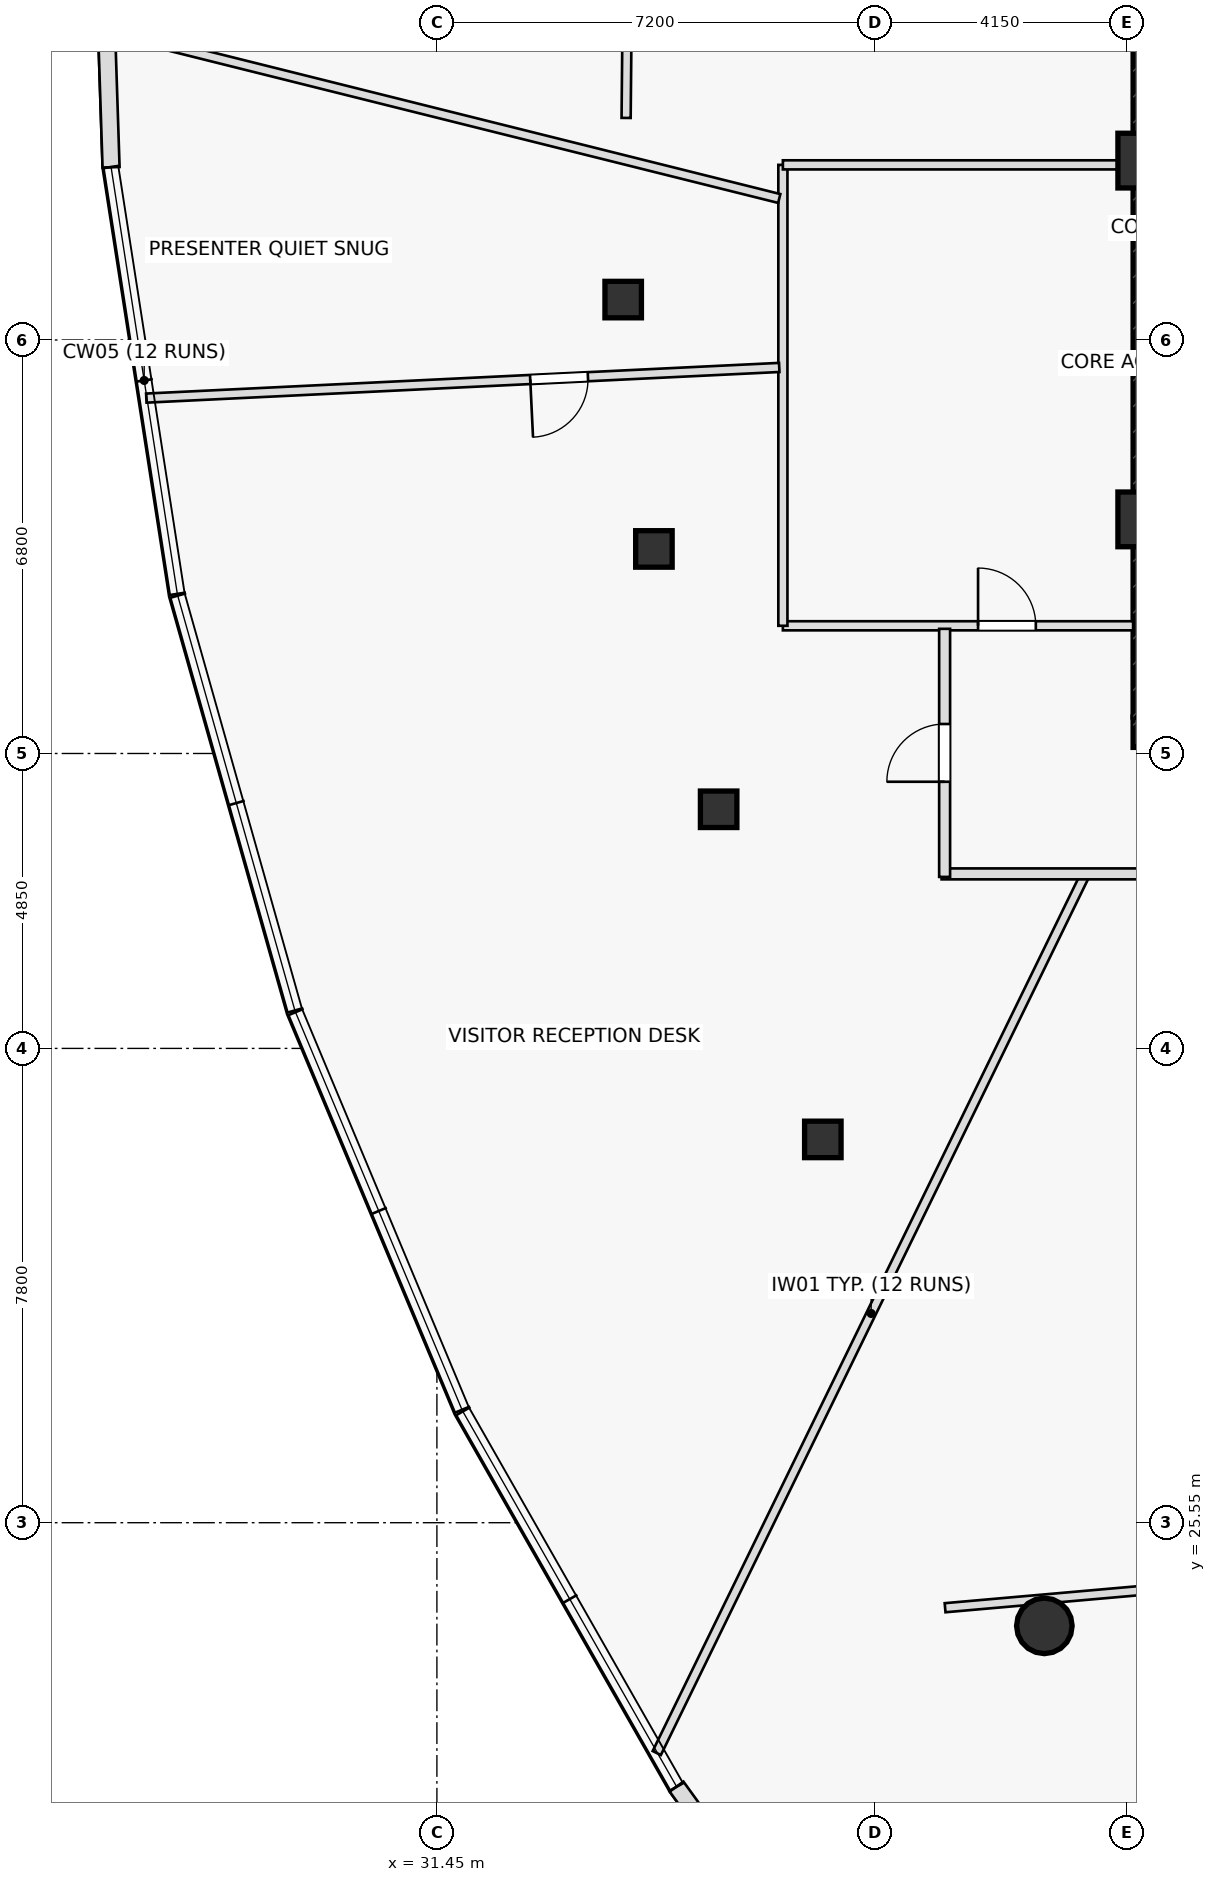
"""IFC4 building model, lengths in metres.
Left out: names, types, materials, properties, quantities, classifications, styles, units other than length and angle.
Written with IfcOpenShell. Run it as: python <this file> out.ifc"""

import sys

from ifc_helpers import new_model, si_unit, direction, frame, frame_2d, origin, origin_2d, place, context, subcontext, project, spatial, rectangle, hollow_rectangle, hollow_circle, extrude, element, fill, save


model = new_model("IFC4")
c1 = context("Model", 3, precision=1e-05, world=origin(), true_north=direction((0.0, 1.0)))
c2 = subcontext(c1, "Body", "Model", "MODEL_VIEW")
j1 = project(units=[si_unit("LENGTHUNIT", "METRE"), si_unit("PLANEANGLEUNIT", "RADIAN")], contexts=[c1])
p1 = place(None, origin())
s1 = spatial("IfcSite", under=j1, at=p1, CompositionType="ELEMENT")
p2 = place(p1, origin())
s2 = spatial("IfcBuilding", under=s1, at=p2, CompositionType="ELEMENT")
p3 = place(p2, frame((0.0, 0.0, 216.95)))
s3 = spatial("IfcBuildingStorey", under=s2, at=p3, CompositionType="ELEMENT", Elevation=216.95)
p4 = place(p3, frame((42.9, 38.55, 0.0), z_axis=(0.0, 0.0, 1.0), x_axis=(1.0, 0.0, 0.0)))
e1 = element("IfcWall", 1, at=p4, inside=s3, PredefinedType="SHEAR", context=c2, shape_type="SweptSolid", body=[
    extrude(rectangle(XDim=14.2, YDim=0.5, at=frame_2d((7.1, 0.0))), origin(), (0.0, 0.0, 1.0), 4.9),
])
p5 = place(p4, frame((0.78, 0.0, 0.0)))
e2 = element("IfcOpeningElement", 2, at=p5, cuts=e1, PredefinedType="OPENING", context=c2, shape_type="SweptSolid", body=[
    extrude(rectangle(XDim=1.05, YDim=2.2, at=frame_2d((0.525, 1.1))), frame((0.0, 0.26, 0.0), z_axis=(0.0, -1.0, 0.0), x_axis=(1.0, 0.0, 0.0)), (0.0, 0.0, 1.0), 0.52),
])
p6 = place(p3, frame((43.15, 38.8, 0.0), z_axis=(0.0, 0.0, 1.0), x_axis=(0.0, 1.0, 0.0)))
e3 = element("IfcWall", 3, at=p6, inside=s3, PredefinedType="SHEAR", context=c2, shape_type="SweptSolid", body=[
    extrude(rectangle(XDim=12.4, YDim=0.5, at=frame_2d((6.2, 0.0))), origin(), (0.0, 0.0, 1.0), 4.9),
])
for number, where, z_axis, x_axis in (
    (4, (43.1, 47.95, 0.0), (0.0, 0.0, 1.0), (1.0, 0.0, 0.0)),
    (5, (43.1, 42.05, 0.0), (0.0, 0.0, 1.0), (1.0, 0.0, 0.0)),
):
    element("IfcColumn", number, at=place(p3, frame(where, z_axis=z_axis, x_axis=x_axis)), inside=s3, PredefinedType="COLUMN", context=c2, shape_type="SweptSolid", body=[
        extrude(rectangle(XDim=0.9, YDim=0.9, at=origin_2d()), origin(), (0.0, 0.0, 1.0), 4.9),
    ])
for number, where, z_axis, x_axis in (
    (6, (34.514, 45.665, 0.0), (0.0, 0.0, 1.0), (1.0, 0.0, 0.0)),
    (7, (35.019, 41.564, 0.0), (0.0, 0.0, 1.0), (1.0, 0.0, 0.0)),
    (8, (36.083, 37.282, 0.0), (0.0, 0.0, 1.0), (1.0, 0.0, 0.0)),
    (9, (37.797, 31.853, 0.0), (0.0, 0.0, 1.0), (1.0, 0.0, 0.0)),
):
    element("IfcColumn", number, at=place(p3, frame(where, z_axis=z_axis, x_axis=x_axis)), inside=s3, PredefinedType="COLUMN", context=c2, shape_type="SweptSolid", body=[
        extrude(hollow_rectangle(XDim=0.6, YDim=0.6, WallThickness=0.036, at=origin_2d()), origin(), (0.0, 0.0, 1.0), 4.9),
    ])
p7 = place(p3, frame((41.44, 23.854, 0.0), z_axis=(0.0, 0.0, 1.0), x_axis=(1.0, 0.0, 0.0)))
e10 = element("IfcColumn", 10, at=p7, inside=s3, PredefinedType="COLUMN", context=c2, shape_type="SweptSolid", body=[
    extrude(hollow_circle(Radius=0.457, WallThickness=0.04, at=origin_2d()), origin(), (0.0, 0.0, 1.0), 4.9),
])
p8 = place(p3, frame((34.652, 58.056, 0.0), z_axis=(0.0, 0.0, 1.0), x_axis=(-0.009553538759, -0.999954363907, 0.0)))
e11 = element("IfcWall", 11, at=p8, inside=s3, PredefinedType="PARTITIONING", context=c2, shape_type="SweptSolid", body=[
    extrude(rectangle(XDim=9.404, YDim=0.15, at=frame_2d((4.702, 0.0))), origin(), (0.0, 0.0, 1.0), 4.385),
])
p9 = place(p3, frame((39.808, 24.152, 0.0), z_axis=(0.0, 0.0, 1.0), x_axis=(0.996153584085, 0.087624408208, 0.0)))
e12 = element("IfcWall", 12, at=p9, inside=s3, PredefinedType="PARTITIONING", context=c2, shape_type="SweptSolid", body=[
    extrude(rectangle(XDim=10.632, YDim=0.15, at=frame_2d((5.316, 0.0))), origin(), (0.0, 0.0, 1.0), 4.385),
])
p10 = place(p3, frame((37.14, 40.3, 0.0), z_axis=(0.0, 0.0, 1.0), x_axis=(1.0, 0.0, 0.0)))
e13 = element("IfcWall", 13, at=p10, inside=s3, PredefinedType="PARTITIONING", context=c2, shape_type="SweptSolid", body=[
    extrude(rectangle(XDim=5.76, YDim=0.15, at=frame_2d((2.88, 0.0))), origin(), (0.0, 0.0, 1.0), 4.275),
])
p11 = place(p10, frame((3.21, 0.0, 0.0)))
e14 = element("IfcOpeningElement", 14, at=p11, cuts=e13, PredefinedType="OPENING", context=c2, shape_type="SweptSolid", body=[
    extrude(rectangle(XDim=0.95, YDim=2.05, at=frame_2d((0.475, 1.025))), frame((0.0, 0.085, 0.0), z_axis=(0.0, -1.0, 0.0), x_axis=(1.0, 0.0, 0.0)), (0.0, 0.0, 1.0), 0.17),
])
p12 = place(p3, frame((37.14, 40.3, 0.0), z_axis=(0.0, 0.0, 1.0), x_axis=(0.0, 1.0, 0.0)))
e15 = element("IfcWall", 15, at=p12, inside=s3, PredefinedType="PARTITIONING", context=c2, shape_type="SweptSolid", body=[
    extrude(rectangle(XDim=7.58, YDim=0.15, at=frame_2d((3.79, 0.0))), origin(), (0.0, 0.0, 1.0), 4.9),
])
p13 = place(p3, frame((37.14, 47.88, 0.0), z_axis=(0.0, 0.0, 1.0), x_axis=(1.0, 0.0, 0.0)))
e16 = element("IfcWall", 16, at=p13, inside=s3, PredefinedType="PARTITIONING", context=c2, shape_type="SweptSolid", body=[
    extrude(rectangle(XDim=5.76, YDim=0.15, at=frame_2d((2.88, 0.0))), origin(), (0.0, 0.0, 1.0), 4.275),
])
p14 = place(p3, frame((42.118, 36.22, 0.0), z_axis=(0.0, 0.0, 1.0), x_axis=(-0.438364723484, -0.898797179126, 0.0)))
e17 = element("IfcWall", 17, at=p14, inside=s3, PredefinedType="PARTITIONING", context=c2, shape_type="SweptSolid", body=[
    extrude(rectangle(XDim=16.086, YDim=0.15, at=frame_2d((8.043, 0.0))), origin(), (0.0, 0.0, 1.0), 4.385),
])
p15 = place(p3, frame((37.08, 47.327, 0.0), z_axis=(0.0, 0.0, 1.0), x_axis=(-0.970214185524, 0.242248703214, 0.0)))
e18 = element("IfcWall", 18, at=p15, inside=s3, PredefinedType="PARTITIONING", context=c2, shape_type="SweptSolid", body=[
    extrude(rectangle(XDim=11.412, YDim=0.15, at=frame_2d((5.706, 0.0))), origin(), (0.0, 0.0, 1.0), 4.385),
])
p16 = place(p3, frame((37.08, 44.549, 0.0), z_axis=(0.0, 0.0, 1.0), x_axis=(-0.998828037423, -0.048399913813, 0.0)))
e19 = element("IfcWall", 19, at=p16, inside=s3, PredefinedType="PARTITIONING", context=c2, shape_type="SweptSolid", body=[
    extrude(rectangle(XDim=10.421, YDim=0.15, at=frame_2d((5.211, 0.0))), origin(), (0.0, 0.0, 1.0), 4.385),
])
p17 = place(p16, frame((3.15, 0.0, 0.0)))
e20 = element("IfcOpeningElement", 20, at=p17, cuts=e19, PredefinedType="OPENING", context=c2, shape_type="SweptSolid", body=[
    extrude(rectangle(XDim=0.95, YDim=2.05, at=frame_2d((0.475, 1.025))), frame((0.0, 0.085, 0.0), z_axis=(0.0, -1.0, 0.0), x_axis=(1.0, 0.0, 0.0)), (0.0, 0.0, 1.0), 0.17),
])
p18 = place(p3, frame((59.23, 36.22, 0.0), z_axis=(0.0, 0.0, 1.0), x_axis=(-1.0, 0.0, 0.0)))
e21 = element("IfcWall", 21, at=p18, inside=s3, PredefinedType="PARTITIONING", context=c2, shape_type="SweptSolid", body=[
    extrude(rectangle(XDim=19.48, YDim=0.18, at=frame_2d((9.74, 0.0))), origin(), (0.0, 0.0, 1.0), 4.275),
])
p19 = place(p18, frame((3.18, 0.0, 0.0)))
e22 = element("IfcOpeningElement", 22, at=p19, cuts=e21, PredefinedType="OPENING", context=c2, shape_type="SweptSolid", body=[
    extrude(rectangle(XDim=0.95, YDim=2.05, at=frame_2d((0.475, 1.025))), frame((0.0, 0.1, 0.0), z_axis=(0.0, -1.0, 0.0), x_axis=(1.0, 0.0, 0.0)), (0.0, 0.0, 1.0), 0.2),
])
p20 = place(p18, frame((11.654, 0.0, 0.0)))
e23 = element("IfcOpeningElement", 23, at=p20, cuts=e21, PredefinedType="OPENING", context=c2, shape_type="SweptSolid", body=[
    extrude(rectangle(XDim=0.95, YDim=2.05, at=frame_2d((0.475, 1.025))), frame((0.0, 0.1, 0.0), z_axis=(0.0, -1.0, 0.0), x_axis=(1.0, 0.0, 0.0)), (0.0, 0.0, 1.0), 0.2),
])
p21 = place(p3, frame((39.8, 36.17, 0.0), z_axis=(0.0, 0.0, 1.0), x_axis=(0.0, 1.0, 0.0)))
e24 = element("IfcWall", 24, at=p21, inside=s3, PredefinedType="PARTITIONING", context=c2, shape_type="SweptSolid", body=[
    extrude(rectangle(XDim=4.08, YDim=0.18, at=frame_2d((2.04, 0.0))), origin(), (0.0, 0.0, 1.0), 4.575),
])
p22 = place(p21, frame((1.565, 0.0, 0.0)))
e25 = element("IfcOpeningElement", 25, at=p22, cuts=e24, PredefinedType="OPENING", context=c2, shape_type="SweptSolid", body=[
    extrude(rectangle(XDim=0.95, YDim=2.05, at=frame_2d((0.475, 1.025))), frame((0.0, 0.1, 0.0), z_axis=(0.0, -1.0, 0.0), x_axis=(1.0, 0.0, 0.0)), (0.0, 0.0, 1.0), 0.2),
])
p23 = place(p3, frame((25.858, 54.975, 0.0), z_axis=(0.0, 0.0, 1.0), x_axis=(0.03273286945, -0.999464136054, 0.0)))
e26 = element("IfcWall", 26, at=p23, inside=s3, PredefinedType="STANDARD", context=c2, shape_type="SweptSolid", body=[
    extrude(rectangle(XDim=7.138, YDim=0.28, at=frame_2d((3.569, 0.0))), origin(), (0.0, 0.0, 1.0), 4.9),
])
p24 = place(p3, frame((35.391, 21.21, 0.0), z_axis=(0.0, 0.0, 1.0), x_axis=(0.585721048236, -0.810512710359, 0.0)))
e27 = element("IfcWall", 27, at=p24, inside=s3, PredefinedType="STANDARD", context=c2, shape_type="SweptSolid", body=[
    extrude(rectangle(XDim=1.856, YDim=0.28, at=frame_2d((0.928, 0.0))), origin(), (0.0, 0.0, 1.0), 4.9),
])
p25 = place(p3, frame((41.575, 19.224, 0.0), z_axis=(0.0, 0.0, 1.0), x_axis=(0.906871974089, 0.421406244154, 0.0)))
e28 = element("IfcWall", 28, at=p25, inside=s3, PredefinedType="STANDARD", context=c2, shape_type="SweptSolid", body=[
    extrude(rectangle(XDim=7.15, YDim=0.28, at=frame_2d((3.575, 0.0))), origin(), (0.0, 0.0, 1.0), 4.9),
])
p26 = place(p11, origin())
e29 = element("IfcDoor", 29, at=p26, inside=s3, OperationType="SINGLE_SWING_LEFT", PredefinedType="DOOR", context=c2, shape_type="SweptSolid", body=[
    extrude(rectangle(XDim=0.95, YDim=2.05, at=frame_2d((0.475, 1.025))), frame((0.0, 0.025, 0.0), z_axis=(0.0, -1.0, 0.0), x_axis=(1.0, 0.0, 0.0)), (0.0, 0.0, 1.0), 0.05),
])
fill(e14, e29)
p27 = place(p17, origin())
e30 = element("IfcDoor", 30, at=p27, inside=s3, OperationType="SINGLE_SWING_RIGHT", PredefinedType="DOOR", context=c2, shape_type="SweptSolid", body=[
    extrude(rectangle(XDim=0.95, YDim=2.05, at=frame_2d((0.475, 1.025))), frame((0.0, 0.025, 0.0), z_axis=(0.0, -1.0, 0.0), x_axis=(1.0, 0.0, 0.0)), (0.0, 0.0, 1.0), 0.05),
])
fill(e20, e30)
p28 = place(p22, origin())
e31 = element("IfcDoor", 31, at=p28, inside=s3, OperationType="SINGLE_SWING_LEFT", PredefinedType="DOOR", context=c2, shape_type="SweptSolid", body=[
    extrude(rectangle(XDim=0.95, YDim=2.05, at=frame_2d((0.475, 1.025))), frame((0.0, 0.025, 0.0), z_axis=(0.0, -1.0, 0.0), x_axis=(1.0, 0.0, 0.0)), (0.0, 0.0, 1.0), 0.05),
])
fill(e25, e31)
save(model, sys.argv[1])
